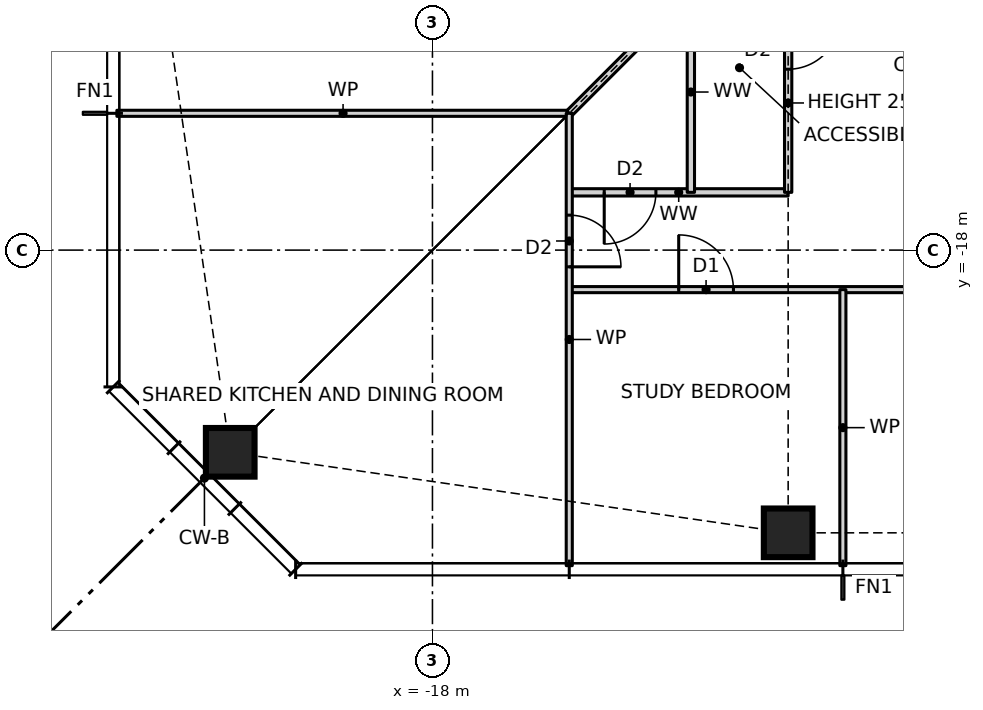
"""IFC4 building model, lengths in metres.
Left out: names, types, materials, properties, quantities, classifications, styles, units other than length and angle.
Written with IfcOpenShell. Run it as: python <this file> out.ifc"""

import sys

from ifc_helpers import new_model, si_unit, direction, frame, frame_2d, origin, origin_2d, place, context, subcontext, project, spatial, rectangle, hollow_rectangle, extrude, element, fill, save


model = new_model("IFC4")
c1 = context("Model", 3, precision=1e-05, world=origin(), true_north=direction((0.0, 1.0)))
c2 = subcontext(c1, "Body", "Model", "MODEL_VIEW")
j1 = project(units=[si_unit("LENGTHUNIT", "METRE"), si_unit("PLANEANGLEUNIT", "RADIAN")], contexts=[c1])
p1 = place(None, origin())
s1 = spatial("IfcSite", under=j1, at=p1, CompositionType="ELEMENT")
p2 = place(p1, origin())
s2 = spatial("IfcBuilding", under=s1, at=p2, CompositionType="ELEMENT")
p3 = place(p2, frame((0.0, 0.0, 46.5)))
s3 = spatial("IfcBuildingStorey", under=s2, at=p3, CompositionType="ELEMENT", Elevation=46.5)
for number, where, z_axis, x_axis in (
    (1, (-21.326, -21.326, 0.0), (0.0, 0.0, 1.0), (1.0, 0.0, 0.0)),
    (2, (-12.15, -22.65, 0.0), (0.0, 0.0, 1.0), (1.0, 0.0, 0.0)),
):
    element("IfcColumn", number, at=place(p3, frame(where, z_axis=z_axis, x_axis=x_axis)), inside=s3, PredefinedType="COLUMN", context=c2, shape_type="SweptSolid", body=[
        extrude(hollow_rectangle(XDim=0.8, YDim=0.8, WallThickness=0.09, at=origin_2d()), origin(), (0.0, 0.0, 1.0), 3.5),
    ])
p4 = place(p3, frame((-15.75, -18.65, 0.0), z_axis=(0.0, 0.0, 1.0), x_axis=(1.0, 0.0, 0.0)))
e3 = element("IfcWall", 3, at=p4, inside=s3, PredefinedType="PARTITIONING", context=c2, shape_type="SweptSolid", body=[
    extrude(rectangle(XDim=31.5, YDim=0.1, at=frame_2d((15.75, 0.0))), origin(), (0.0, 0.0, 1.0), 3.27),
])
p5 = place(p4, frame((1.8, 0.0, 0.0)))
e4 = element("IfcOpeningElement", 4, at=p5, cuts=e3, PredefinedType="OPENING", context=c2, shape_type="SweptSolid", body=[
    extrude(rectangle(XDim=0.9, YDim=2.1, at=frame_2d((0.45, 1.05))), frame((0.0, 0.06, 0.0), z_axis=(0.0, -1.0, 0.0), x_axis=(1.0, 0.0, 0.0)), (0.0, 0.0, 1.0), 0.12),
])
p6 = place(p4, frame((6.3, 0.0, 0.0)))
e5 = element("IfcOpeningElement", 5, at=p6, cuts=e3, PredefinedType="OPENING", context=c2, shape_type="SweptSolid", body=[
    extrude(rectangle(XDim=0.9, YDim=2.1, at=frame_2d((0.45, 1.05))), frame((0.0, 0.06, 0.0), z_axis=(0.0, -1.0, 0.0), x_axis=(1.0, 0.0, 0.0)), (0.0, 0.0, 1.0), 0.12),
])
p7 = place(p4, frame((10.8, 0.0, 0.0)))
e6 = element("IfcOpeningElement", 6, at=p7, cuts=e3, PredefinedType="OPENING", context=c2, shape_type="SweptSolid", body=[
    extrude(rectangle(XDim=0.9, YDim=2.1, at=frame_2d((0.45, 1.05))), frame((0.0, 0.06, 0.0), z_axis=(0.0, -1.0, 0.0), x_axis=(1.0, 0.0, 0.0)), (0.0, 0.0, 1.0), 0.12),
])
p8 = place(p4, frame((15.3, 0.0, 0.0)))
e7 = element("IfcOpeningElement", 7, at=p8, cuts=e3, PredefinedType="OPENING", context=c2, shape_type="SweptSolid", body=[
    extrude(rectangle(XDim=0.9, YDim=2.1, at=frame_2d((0.45, 1.05))), frame((0.0, 0.06, 0.0), z_axis=(0.0, -1.0, 0.0), x_axis=(1.0, 0.0, 0.0)), (0.0, 0.0, 1.0), 0.12),
])
p9 = place(p4, frame((19.8, 0.0, 0.0)))
e8 = element("IfcOpeningElement", 8, at=p9, cuts=e3, PredefinedType="OPENING", context=c2, shape_type="SweptSolid", body=[
    extrude(rectangle(XDim=0.9, YDim=2.1, at=frame_2d((0.45, 1.05))), frame((0.0, 0.06, 0.0), z_axis=(0.0, -1.0, 0.0), x_axis=(1.0, 0.0, 0.0)), (0.0, 0.0, 1.0), 0.12),
])
p10 = place(p4, frame((24.3, 0.0, 0.0)))
e9 = element("IfcOpeningElement", 9, at=p10, cuts=e3, PredefinedType="OPENING", context=c2, shape_type="SweptSolid", body=[
    extrude(rectangle(XDim=0.9, YDim=2.1, at=frame_2d((0.45, 1.05))), frame((0.0, 0.06, 0.0), z_axis=(0.0, -1.0, 0.0), x_axis=(1.0, 0.0, 0.0)), (0.0, 0.0, 1.0), 0.12),
])
p11 = place(p4, frame((28.8, 0.0, 0.0)))
e10 = element("IfcOpeningElement", 10, at=p11, cuts=e3, PredefinedType="OPENING", context=c2, shape_type="SweptSolid", body=[
    extrude(rectangle(XDim=0.9, YDim=2.1, at=frame_2d((0.45, 1.05))), frame((0.0, 0.06, 0.0), z_axis=(0.0, -1.0, 0.0), x_axis=(1.0, 0.0, 0.0)), (0.0, 0.0, 1.0), 0.12),
])
p12 = place(p3, frame((-15.75, -17.05, 0.0), z_axis=(0.0, 0.0, 1.0), x_axis=(1.0, 0.0, 0.0)))
e11 = element("IfcWall", 11, at=p12, inside=s3, PredefinedType="PARTITIONING", context=c2, shape_type="SweptSolid", body=[
    extrude(rectangle(XDim=3.6, YDim=0.12, at=frame_2d((1.8, 0.0))), origin(), (0.0, 0.0, 1.0), 3.27),
])
p13 = place(p12, frame((0.575, 0.0, 0.0)))
e12 = element("IfcOpeningElement", 12, at=p13, cuts=e11, PredefinedType="OPENING", context=c2, shape_type="SweptSolid", body=[
    extrude(rectangle(XDim=0.85, YDim=2.1, at=frame_2d((0.425, 1.05))), frame((0.0, 0.07, 0.0), z_axis=(0.0, -1.0, 0.0), x_axis=(1.0, 0.0, 0.0)), (0.0, 0.0, 1.0), 0.14),
])
p14 = place(p3, frame((-23.19, -15.75, 0.0), z_axis=(0.0, 0.0, 1.0), x_axis=(1.0, 0.0, 0.0)))
e13 = element("IfcWall", 13, at=p14, inside=s3, PredefinedType="PARTITIONING", context=c2, shape_type="SweptSolid", body=[
    extrude(rectangle(XDim=7.44, YDim=0.1, at=frame_2d((3.72, 0.0))), origin(), (0.0, 0.0, 1.0), 3.27),
])
p15 = place(p3, frame((-15.75, -15.75, 0.0), z_axis=(0.0, 0.0, 1.0), x_axis=(0.707106781187, 0.707106781187, 0.0)))
e14 = element("IfcWall", 14, at=p15, inside=s3, PredefinedType="PARTITIONING", context=c2, shape_type="SweptSolid", body=[
    extrude(rectangle(XDim=5.869, YDim=0.12, at=frame_2d((2.935, 0.0))), origin(), (0.0, 0.0, 1.0), 2.343),
])
p16 = place(p3, frame((-11.25, -23.19, 0.0), z_axis=(0.0, 0.0, 1.0), x_axis=(0.0, 1.0, 0.0)))
e15 = element("IfcWall", 15, at=p16, inside=s3, PredefinedType="PARTITIONING", context=c2, shape_type="SweptSolid", body=[
    extrude(rectangle(XDim=4.54, YDim=0.1, at=frame_2d((2.27, 0.0))), origin(), (0.0, 0.0, 1.0), 3.27),
])
p17 = place(p3, frame((-12.15, -17.05, 0.0), z_axis=(0.0, 0.0, 1.0), x_axis=(0.0, 1.0, 0.0)))
e16 = element("IfcWall", 16, at=p17, inside=s3, PredefinedType="PARTITIONING", context=c2, shape_type="SweptSolid", body=[
    extrude(rectangle(XDim=4.9, YDim=0.12, at=frame_2d((2.45, 0.0))), origin(), (0.0, 0.0, 1.0), 2.508),
])
p18 = place(p17, frame((2.025, 0.0, 0.0)))
e17 = element("IfcOpeningElement", 17, at=p18, cuts=e16, PredefinedType="OPENING", context=c2, shape_type="SweptSolid", body=[
    extrude(rectangle(XDim=0.85, YDim=2.1, at=frame_2d((0.425, 1.05))), frame((0.0, 0.07, 0.0), z_axis=(0.0, -1.0, 0.0), x_axis=(1.0, 0.0, 0.0)), (0.0, 0.0, 1.0), 0.14),
])
p19 = place(p3, frame((-13.75, -17.05, 0.0), z_axis=(0.0, 0.0, 1.0), x_axis=(0.0, 1.0, 0.0)))
e18 = element("IfcWall", 18, at=p19, inside=s3, PredefinedType="PARTITIONING", context=c2, shape_type="SweptSolid", body=[
    extrude(rectangle(XDim=3.3, YDim=0.12, at=frame_2d((1.65, 0.0))), origin(), (0.0, 0.0, 1.0), 3.27),
])
p20 = place(p3, frame((-15.75, -23.19, 0.0), z_axis=(0.0, 0.0, 1.0), x_axis=(0.0, 1.0, 0.0)))
e19 = element("IfcWall", 19, at=p20, inside=s3, PredefinedType="PARTITIONING", context=c2, shape_type="SweptSolid", body=[
    extrude(rectangle(XDim=7.44, YDim=0.1, at=frame_2d((3.72, 0.0))), origin(), (0.0, 0.0, 1.0), 3.27),
])
p21 = place(p20, frame((4.915, 0.0, 0.0)))
e20 = element("IfcOpeningElement", 20, at=p21, cuts=e19, PredefinedType="OPENING", context=c2, shape_type="SweptSolid", body=[
    extrude(rectangle(XDim=0.85, YDim=2.1, at=frame_2d((0.425, 1.05))), frame((0.0, 0.06, 0.0), z_axis=(0.0, -1.0, 0.0), x_axis=(1.0, 0.0, 0.0)), (0.0, 0.0, 1.0), 0.12),
])
p22 = place(p5, origin())
e21 = element("IfcDoor", 21, at=p22, inside=s3, OperationType="SINGLE_SWING_LEFT", PredefinedType="DOOR", context=c2, shape_type="SweptSolid", body=[
    extrude(rectangle(XDim=0.9, YDim=2.1, at=frame_2d((0.45, 1.05))), frame((0.0, 0.025, 0.0), z_axis=(0.0, -1.0, 0.0), x_axis=(1.0, 0.0, 0.0)), (0.0, 0.0, 1.0), 0.05),
])
fill(e4, e21)
p23 = place(p13, frame((0.85, 0.0, 0.0), z_axis=(0.0, 0.0, 1.0), x_axis=(-1.0, 0.0, 0.0)))
e22 = element("IfcDoor", 22, at=p23, inside=s3, OperationType="SINGLE_SWING_RIGHT", PredefinedType="DOOR", context=c2, shape_type="SweptSolid", body=[
    extrude(rectangle(XDim=0.85, YDim=2.1, at=frame_2d((0.425, 1.05))), frame((0.0, 0.025, 0.0), z_axis=(0.0, -1.0, 0.0), x_axis=(1.0, 0.0, 0.0)), (0.0, 0.0, 1.0), 0.05),
])
fill(e12, e22)
p24 = place(p18, frame((0.85, 0.0, 0.0), z_axis=(0.0, 0.0, 1.0), x_axis=(-1.0, 0.0, 0.0)))
e23 = element("IfcDoor", 23, at=p24, inside=s3, OperationType="SINGLE_SWING_LEFT", PredefinedType="DOOR", context=c2, shape_type="SweptSolid", body=[
    extrude(rectangle(XDim=0.85, YDim=2.1, at=frame_2d((0.425, 1.05))), frame((0.0, 0.025, 0.0), z_axis=(0.0, -1.0, 0.0), x_axis=(1.0, 0.0, 0.0)), (0.0, 0.0, 1.0), 0.05),
])
fill(e17, e23)
p25 = place(p21, frame((0.85, 0.0, 0.0), z_axis=(0.0, 0.0, 1.0), x_axis=(-1.0, 0.0, 0.0)))
e24 = element("IfcDoor", 24, at=p25, inside=s3, OperationType="SINGLE_SWING_RIGHT", PredefinedType="DOOR", context=c2, shape_type="SweptSolid", body=[
    extrude(rectangle(XDim=0.85, YDim=2.1, at=frame_2d((0.425, 1.05))), frame((0.0, 0.025, 0.0), z_axis=(0.0, -1.0, 0.0), x_axis=(1.0, 0.0, 0.0)), (0.0, 0.0, 1.0), 0.05),
])
fill(e20, e24)
save(model, sys.argv[1])
